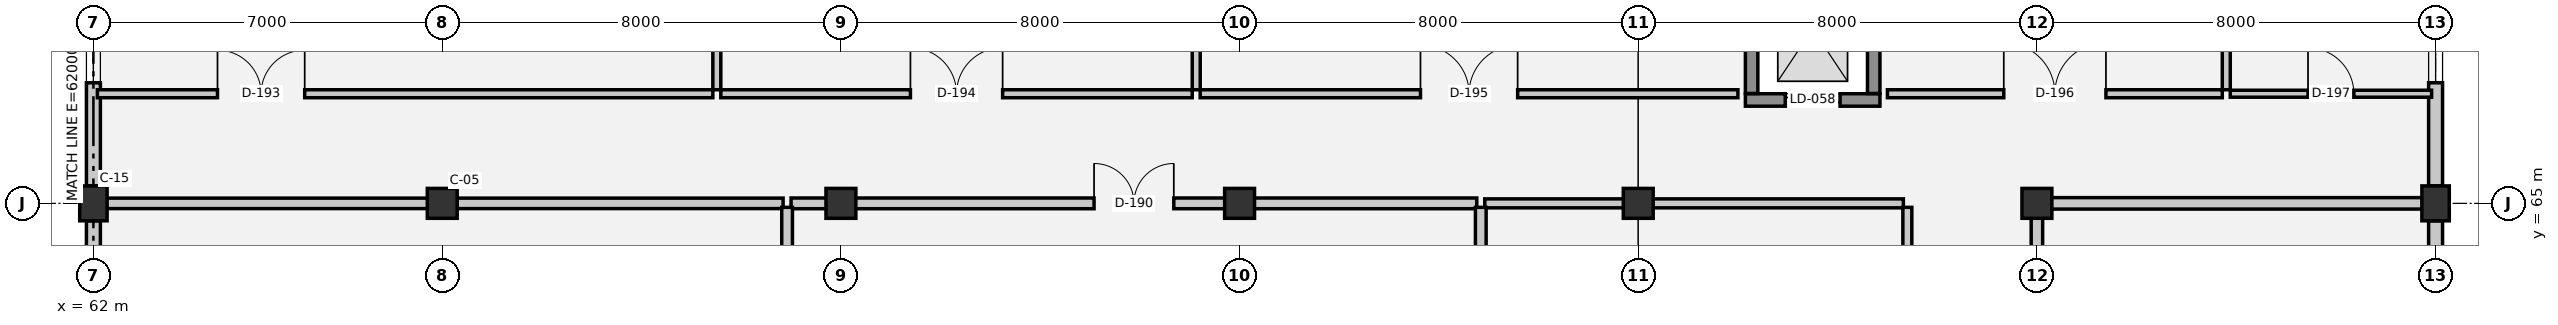
"""IFC4 building model, lengths in metres.
Left out: names, types, materials, properties, quantities, classifications, styles, units other than length and angle.
Written with IfcOpenShell. Run it as: python <this file> out.ifc"""

import sys

from ifc_helpers import new_model, si_unit, direction, frame, frame_2d, origin, origin_2d, place, context, subcontext, project, spatial, rectangle, extrude, element, fill, save


model = new_model("IFC4")
c1 = context("Model", 3, precision=1e-05, world=origin(), true_north=direction((0.0, 1.0)))
c2 = subcontext(c1, "Body", "Model", "MODEL_VIEW")
j1 = project(units=[si_unit("LENGTHUNIT", "METRE"), si_unit("PLANEANGLEUNIT", "RADIAN")], contexts=[c1])
p1 = place(None, origin())
s1 = spatial("IfcSite", under=j1, at=p1, CompositionType="ELEMENT")
p2 = place(p1, origin())
s2 = spatial("IfcBuilding", under=s1, at=p2, CompositionType="ELEMENT")
p3 = place(p2, frame((0.0, 0.0, 29.55)))
s3 = spatial("IfcBuildingStorey", under=s2, at=p3, CompositionType="ELEMENT", Elevation=29.55)
p4 = place(p3, frame((62.0, 65.0, 0.0), z_axis=(0.0, 0.0, 1.0), x_axis=(1.0, 0.0, 0.0)))
e1 = element("IfcColumn", 1, at=p4, inside=s3, PredefinedType="COLUMN", context=c2, shape_type="SweptSolid", body=[
    extrude(rectangle(XDim=0.55, YDim=0.7, at=origin_2d()), origin(), (0.0, 0.0, 1.0), 3.75),
])
for number, where, z_axis, x_axis in (
    (2, (69.0, 65.0, 0.0), (0.0, 0.0, 1.0), (1.0, 0.0, 0.0)),
    (3, (77.0, 65.0, 0.0), (0.0, 0.0, 1.0), (1.0, 0.0, 0.0)),
    (4, (85.0, 65.0, 0.0), (0.0, 0.0, 1.0), (1.0, 0.0, 0.0)),
    (5, (93.0, 65.0, 0.0), (0.0, 0.0, 1.0), (1.0, 0.0, 0.0)),
    (6, (101.0, 65.0, 0.0), (0.0, 0.0, 1.0), (1.0, 0.0, 0.0)),
):
    element("IfcColumn", number, at=place(p3, frame(where, z_axis=z_axis, x_axis=x_axis)), inside=s3, PredefinedType="COLUMN", context=c2, shape_type="SweptSolid", body=[
        extrude(rectangle(XDim=0.6, YDim=0.6, at=origin_2d()), origin(), (0.0, 0.0, 1.0), 3.75),
    ])
p5 = place(p3, frame((109.0, 65.0, 0.0), z_axis=(0.0, 0.0, 1.0), x_axis=(1.0, 0.0, 0.0)))
e7 = element("IfcColumn", 7, at=p5, inside=s3, PredefinedType="COLUMN", context=c2, shape_type="SweptSolid", body=[
    extrude(rectangle(XDim=0.55, YDim=0.7, at=origin_2d()), origin(), (0.0, 0.0, 1.0), 3.75),
])
p6 = place(p3, frame((62.0, 51.35, 0.0), z_axis=(0.0, 0.0, 1.0), x_axis=(0.0, 1.0, 0.0)))
e8 = element("IfcWall", 8, at=p6, inside=s3, PredefinedType="SOLIDWALL", context=c2, shape_type="SweptSolid", body=[
    extrude(rectangle(XDim=13.3, YDim=0.28, at=frame_2d((6.65, 0.0))), origin(), (0.0, 0.0, 1.0), 2.56),
])
p7 = place(p6, frame((5.55, 0.0, 0.9)))
e9 = element("IfcOpeningElement", 9, at=p7, cuts=e8, PredefinedType="OPENING", context=c2, shape_type="SweptSolid", body=[
    extrude(rectangle(XDim=2.2, YDim=1.0, at=frame_2d((1.1, 0.5))), frame((0.0, 0.15, 0.0), z_axis=(0.0, -1.0, 0.0), x_axis=(1.0, 0.0, 0.0)), (0.0, 0.0, 1.0), 0.3),
])
p8 = place(p3, frame((62.0, 65.35, 0.0), z_axis=(0.0, 0.0, 1.0), x_axis=(0.0, 1.0, 0.0)))
e10 = element("IfcWall", 10, at=p8, inside=s3, PredefinedType="SOLIDWALL", context=c2, shape_type="SweptSolid", body=[
    extrude(rectangle(XDim=6.3, YDim=0.28, at=frame_2d((3.15, 0.0))), origin(), (0.0, 0.0, 1.0), 2.56),
])
p9 = place(p8, frame((2.07, 0.0, 0.9)))
e11 = element("IfcOpeningElement", 11, at=p9, cuts=e10, PredefinedType="OPENING", context=c2, shape_type="SweptSolid", body=[
    extrude(rectangle(XDim=2.2, YDim=1.0, at=frame_2d((1.1, 0.5))), frame((0.0, 0.15, 0.0), z_axis=(0.0, -1.0, 0.0), x_axis=(1.0, 0.0, 0.0)), (0.0, 0.0, 1.0), 0.3),
])
p10 = place(p3, frame((109.0, 71.65, 0.0), z_axis=(0.0, 0.0, 1.0), x_axis=(0.0, -1.0, 0.0)))
e12 = element("IfcWall", 12, at=p10, inside=s3, PredefinedType="SOLIDWALL", context=c2, shape_type="SweptSolid", body=[
    extrude(rectangle(XDim=6.3, YDim=0.28, at=frame_2d((3.15, 0.0))), origin(), (0.0, 0.0, 1.0), 2.56),
])
p11 = place(p10, frame((2.03, 0.0, 0.9)))
e13 = element("IfcOpeningElement", 13, at=p11, cuts=e12, PredefinedType="OPENING", context=c2, shape_type="SweptSolid", body=[
    extrude(rectangle(XDim=2.2, YDim=1.0, at=frame_2d((1.1, 0.5))), frame((0.0, 0.15, 0.0), z_axis=(0.0, -1.0, 0.0), x_axis=(1.0, 0.0, 0.0)), (0.0, 0.0, 1.0), 0.3),
])
p12 = place(p3, frame((109.0, 64.65, 0.0), z_axis=(0.0, 0.0, 1.0), x_axis=(0.0, -1.0, 0.0)))
e14 = element("IfcWall", 14, at=p12, inside=s3, PredefinedType="SOLIDWALL", context=c2, shape_type="SweptSolid", body=[
    extrude(rectangle(XDim=13.3, YDim=0.28, at=frame_2d((6.65, 0.0))), origin(), (0.0, 0.0, 1.0), 2.56),
])
p13 = place(p12, frame((5.55, 0.0, 0.9)))
e15 = element("IfcOpeningElement", 15, at=p13, cuts=e14, PredefinedType="OPENING", context=c2, shape_type="SweptSolid", body=[
    extrude(rectangle(XDim=2.2, YDim=1.0, at=frame_2d((1.1, 0.5))), frame((0.0, 0.15, 0.0), z_axis=(0.0, -1.0, 0.0), x_axis=(1.0, 0.0, 0.0)), (0.0, 0.0, 1.0), 0.3),
])
p14 = place(p3, frame((95.15, 67.075, 0.0), z_axis=(0.0, 0.0, 1.0), x_axis=(1.0, 0.0, 0.0)))
e16 = element("IfcWall", 16, at=p14, inside=s3, PredefinedType="SHEAR", context=c2, shape_type="SweptSolid", body=[
    extrude(rectangle(XDim=2.7, YDim=0.25, at=frame_2d((1.35, 0.0))), origin(), (0.0, 0.0, 1.0), 3.75),
])
p15 = place(p14, frame((0.8, 0.0, 0.0)))
e17 = element("IfcOpeningElement", 17, at=p15, cuts=e16, PredefinedType="OPENING", context=c2, shape_type="SweptSolid", body=[
    extrude(rectangle(XDim=1.1, YDim=2.15, at=frame_2d((0.55, 1.075))), frame((0.0, 0.135, 0.0), z_axis=(0.0, -1.0, 0.0), x_axis=(1.0, 0.0, 0.0)), (0.0, 0.0, 1.0), 0.27),
])
for number, where, z_axis, x_axis in (
    (18, (95.275, 69.795, 0.0), (0.0, 0.0, 1.0), (0.0, -1.0, 0.0)),
    (19, (97.725, 67.205, 0.0), (0.0, 0.0, 1.0), (0.0, 1.0, 0.0)),
):
    element("IfcWall", number, at=place(p3, frame(where, z_axis=z_axis, x_axis=x_axis)), inside=s3, PredefinedType="SHEAR", context=c2, shape_type="SweptSolid", body=[
        extrude(rectangle(XDim=2.59, YDim=0.25, at=frame_2d((1.295, 0.0))), origin(), (0.0, 0.0, 1.0), 3.75),
    ])
p16 = place(p3, frame((62.08, 65.0, 0.0), z_axis=(0.0, 0.0, 1.0), x_axis=(1.0, 0.0, 0.0)))
e20 = element("IfcWall", 20, at=p16, inside=s3, PredefinedType="PARTITIONING", context=c2, shape_type="SweptSolid", body=[
    extrude(rectangle(XDim=13.76, YDim=0.21, at=frame_2d((6.88, 0.0))), origin(), (0.0, 0.0, 1.0), 2.78),
])
p17 = place(p3, frame((76.0, 65.0, 0.0), z_axis=(0.0, 0.0, 1.0), x_axis=(1.0, 0.0, 0.0)))
e21 = element("IfcWall", 21, at=p17, inside=s3, PredefinedType="PARTITIONING", context=c2, shape_type="SweptSolid", body=[
    extrude(rectangle(XDim=13.76, YDim=0.215, at=frame_2d((6.88, 0.0))), origin(), (0.0, 0.0, 1.0), 2.78),
])
p18 = place(p17, frame((6.08, 0.0, 0.0)))
e22 = element("IfcOpeningElement", 22, at=p18, cuts=e21, PredefinedType="OPENING", context=c2, shape_type="SweptSolid", body=[
    extrude(rectangle(XDim=1.6, YDim=2.25, at=frame_2d((0.8, 1.125))), frame((0.0, 0.117, 0.0), z_axis=(0.0, -1.0, 0.0), x_axis=(1.0, 0.0, 0.0)), (0.0, 0.0, 1.0), 0.235),
])
p19 = place(p3, frame((89.92, 65.0, 0.0), z_axis=(0.0, 0.0, 1.0), x_axis=(1.0, 0.0, 0.0)))
e23 = element("IfcWall", 23, at=p19, inside=s3, PredefinedType="PARTITIONING", context=c2, shape_type="SweptSolid", body=[
    extrude(rectangle(XDim=8.4, YDim=0.18, at=frame_2d((4.2, 0.0))), origin(), (0.0, 0.0, 1.0), 2.78),
])
p20 = place(p3, frame((101.08, 65.0, 0.0), z_axis=(0.0, 0.0, 1.0), x_axis=(1.0, 0.0, 0.0)))
e24 = element("IfcWall", 24, at=p20, inside=s3, PredefinedType="PARTITIONING", context=c2, shape_type="SweptSolid", body=[
    extrude(rectangle(XDim=7.84, YDim=0.23, at=frame_2d((3.92, 0.0))), origin(), (0.0, 0.0, 1.0), 2.78),
])
p21 = place(p3, frame((62.08, 67.2, 0.0), z_axis=(0.0, 0.0, 1.0), x_axis=(1.0, 0.0, 0.0)))
e25 = element("IfcWall", 25, at=p21, inside=s3, PredefinedType="PARTITIONING", context=c2, shape_type="SweptSolid", body=[
    extrude(rectangle(XDim=12.35, YDim=0.16, at=frame_2d((6.175, 0.0))), origin(), (0.0, 0.0, 1.0), 3.39),
])
p22 = place(p21, frame((2.41, 0.0, 0.0)))
e26 = element("IfcOpeningElement", 26, at=p22, cuts=e25, PredefinedType="OPENING", context=c2, shape_type="SweptSolid", body=[
    extrude(rectangle(XDim=1.75, YDim=2.3, at=frame_2d((0.875, 1.15))), frame((0.0, 0.09, 0.0), z_axis=(0.0, -1.0, 0.0), x_axis=(1.0, 0.0, 0.0)), (0.0, 0.0, 1.0), 0.18),
])
p23 = place(p3, frame((74.59, 67.2, 0.0), z_axis=(0.0, 0.0, 1.0), x_axis=(1.0, 0.0, 0.0)))
e27 = element("IfcWall", 27, at=p23, inside=s3, PredefinedType="PARTITIONING", context=c2, shape_type="SweptSolid", body=[
    extrude(rectangle(XDim=9.46, YDim=0.16, at=frame_2d((4.73, 0.0))), origin(), (0.0, 0.0, 1.0), 3.39),
])
p24 = place(p23, frame((3.805, 0.0, 0.0)))
e28 = element("IfcOpeningElement", 28, at=p24, cuts=e27, PredefinedType="OPENING", context=c2, shape_type="SweptSolid", body=[
    extrude(rectangle(XDim=1.85, YDim=2.3, at=frame_2d((0.925, 1.15))), frame((0.0, 0.09, 0.0), z_axis=(0.0, -1.0, 0.0), x_axis=(1.0, 0.0, 0.0)), (0.0, 0.0, 1.0), 0.18),
])
p25 = place(p3, frame((84.21, 67.2, 0.0), z_axis=(0.0, 0.0, 1.0), x_axis=(1.0, 0.0, 0.0)))
e29 = element("IfcWall", 29, at=p25, inside=s3, PredefinedType="PARTITIONING", context=c2, shape_type="SweptSolid", body=[
    extrude(rectangle(XDim=10.79, YDim=0.16, at=frame_2d((5.395, 0.0))), origin(), (0.0, 0.0, 1.0), 3.39),
])
p26 = place(p25, frame((4.42, 0.0, 0.0)))
e30 = element("IfcOpeningElement", 30, at=p26, cuts=e29, PredefinedType="OPENING", context=c2, shape_type="SweptSolid", body=[
    extrude(rectangle(XDim=1.95, YDim=2.35, at=frame_2d((0.975, 1.175))), frame((0.0, 0.09, 0.0), z_axis=(0.0, -1.0, 0.0), x_axis=(1.0, 0.0, 0.0)), (0.0, 0.0, 1.0), 0.18),
])
p27 = place(p3, frame((98.0, 67.2, 0.0), z_axis=(0.0, 0.0, 1.0), x_axis=(1.0, 0.0, 0.0)))
e31 = element("IfcWall", 31, at=p27, inside=s3, PredefinedType="PARTITIONING", context=c2, shape_type="SweptSolid", body=[
    extrude(rectangle(XDim=6.72, YDim=0.16, at=frame_2d((3.36, 0.0))), origin(), (0.0, 0.0, 1.0), 3.39),
])
p28 = place(p27, frame((2.335, 0.0, 0.0)))
e32 = element("IfcOpeningElement", 32, at=p28, cuts=e31, PredefinedType="OPENING", context=c2, shape_type="SweptSolid", body=[
    extrude(rectangle(XDim=2.05, YDim=2.35, at=frame_2d((1.025, 1.175))), frame((0.0, 0.09, 0.0), z_axis=(0.0, -1.0, 0.0), x_axis=(1.0, 0.0, 0.0)), (0.0, 0.0, 1.0), 0.18),
])
p29 = place(p3, frame((104.88, 67.2, 0.0), z_axis=(0.0, 0.0, 1.0), x_axis=(1.0, 0.0, 0.0)))
e33 = element("IfcWall", 33, at=p29, inside=s3, PredefinedType="PLUMBINGWALL", context=c2, shape_type="SweptSolid", body=[
    extrude(rectangle(XDim=4.04, YDim=0.14, at=frame_2d((2.02, 0.0))), origin(), (0.0, 0.0, 1.0), 3.39),
])
p30 = place(p29, frame((1.56, 0.0, 0.0)))
e34 = element("IfcOpeningElement", 34, at=p30, cuts=e33, PredefinedType="OPENING", context=c2, shape_type="SweptSolid", body=[
    extrude(rectangle(XDim=0.92, YDim=2.1, at=frame_2d((0.46, 1.05))), frame((0.0, 0.08, 0.0), z_axis=(0.0, -1.0, 0.0), x_axis=(1.0, 0.0, 0.0)), (0.0, 0.0, 1.0), 0.16),
])
p31 = place(p3, frame((74.51, 67.28, 0.0), z_axis=(0.0, 0.0, 1.0), x_axis=(0.0, 1.0, 0.0)))
e35 = element("IfcWall", 35, at=p31, inside=s3, PredefinedType="PARTITIONING", context=c2, shape_type="SweptSolid", body=[
    extrude(rectangle(XDim=4.64, YDim=0.16, at=frame_2d((2.32, 0.0))), origin(), (0.0, 0.0, 1.0), 3.39),
])
p32 = place(p3, frame((75.92, 51.08, 0.0), z_axis=(0.0, 0.0, 1.0), x_axis=(0.0, 1.0, 0.0)))
e36 = element("IfcWall", 36, at=p32, inside=s3, PredefinedType="PARTITIONING", context=c2, shape_type="SweptSolid", body=[
    extrude(rectangle(XDim=13.84, YDim=0.215, at=frame_2d((6.92, 0.0))), origin(), (0.0, 0.0, 1.0), 3.39),
])
p33 = place(p3, frame((84.13, 67.28, 0.0), z_axis=(0.0, 0.0, 1.0), x_axis=(0.0, 1.0, 0.0)))
e37 = element("IfcWall", 37, at=p33, inside=s3, PredefinedType="PARTITIONING", context=c2, shape_type="SweptSolid", body=[
    extrude(rectangle(XDim=4.64, YDim=0.16, at=frame_2d((2.32, 0.0))), origin(), (0.0, 0.0, 1.0), 3.39),
])
p34 = place(p3, frame((89.84, 51.08, 0.0), z_axis=(0.0, 0.0, 1.0), x_axis=(0.0, 1.0, 0.0)))
e38 = element("IfcWall", 38, at=p34, inside=s3, PredefinedType="PARTITIONING", context=c2, shape_type="SweptSolid", body=[
    extrude(rectangle(XDim=13.84, YDim=0.215, at=frame_2d((6.92, 0.0))), origin(), (0.0, 0.0, 1.0), 3.39),
])
p35 = place(p3, frame((98.4, 51.08, 0.0), z_axis=(0.0, 0.0, 1.0), x_axis=(0.0, 1.0, 0.0)))
e39 = element("IfcWall", 39, at=p35, inside=s3, PredefinedType="PARTITIONING", context=c2, shape_type="SweptSolid", body=[
    extrude(rectangle(XDim=13.84, YDim=0.18, at=frame_2d((6.92, 0.0))), origin(), (0.0, 0.0, 1.0), 3.39),
])
p36 = place(p35, frame((6.345, 0.0, 0.0)))
e40 = element("IfcOpeningElement", 40, at=p36, cuts=e39, PredefinedType="OPENING", context=c2, shape_type="SweptSolid", body=[
    extrude(rectangle(XDim=1.15, YDim=2.2, at=frame_2d((0.575, 1.1))), frame((0.0, 0.1, 0.0), z_axis=(0.0, -1.0, 0.0), x_axis=(1.0, 0.0, 0.0)), (0.0, 0.0, 1.0), 0.2),
])
p37 = place(p3, frame((101.0, 51.08, 0.0), z_axis=(0.0, 0.0, 1.0), x_axis=(0.0, 1.0, 0.0)))
e41 = element("IfcWall", 41, at=p37, inside=s3, PredefinedType="PARTITIONING", context=c2, shape_type="SweptSolid", body=[
    extrude(rectangle(XDim=13.84, YDim=0.23, at=frame_2d((6.92, 0.0))), origin(), (0.0, 0.0, 1.0), 2.58),
])
p38 = place(p37, frame((6.07, 0.0, 0.0)))
e42 = element("IfcOpeningElement", 42, at=p38, cuts=e41, PredefinedType="OPENING", context=c2, shape_type="SweptSolid", body=[
    extrude(rectangle(XDim=1.7, YDim=2.3, at=frame_2d((0.85, 1.15))), frame((0.0, 0.125, 0.0), z_axis=(0.0, -1.0, 0.0), x_axis=(1.0, 0.0, 0.0)), (0.0, 0.0, 1.0), 0.25),
])
p39 = place(p3, frame((104.8, 67.28, 0.0), z_axis=(0.0, 0.0, 1.0), x_axis=(0.0, 1.0, 0.0)))
e43 = element("IfcWall", 43, at=p39, inside=s3, PredefinedType="PARTITIONING", context=c2, shape_type="SweptSolid", body=[
    extrude(rectangle(XDim=4.64, YDim=0.16, at=frame_2d((2.32, 0.0))), origin(), (0.0, 0.0, 1.0), 3.39),
])
p40 = place(p9, origin())
e44 = element("IfcWindow", 44, at=p40, inside=s3, PartitioningType="SINGLE_PANEL", PredefinedType="WINDOW", context=c2, shape_type="SweptSolid", body=[
    extrude(rectangle(XDim=2.2, YDim=1.0, at=frame_2d((1.1, 0.5))), frame((0.0, 0.03, 0.0), z_axis=(0.0, -1.0, 0.0), x_axis=(1.0, 0.0, 0.0)), (0.0, 0.0, 1.0), 0.06),
])
fill(e11, e44)
p41 = place(p11, origin())
e45 = element("IfcWindow", 45, at=p41, inside=s3, PartitioningType="SINGLE_PANEL", PredefinedType="WINDOW", context=c2, shape_type="SweptSolid", body=[
    extrude(rectangle(XDim=2.2, YDim=1.0, at=frame_2d((1.1, 0.5))), frame((0.0, 0.03, 0.0), z_axis=(0.0, -1.0, 0.0), x_axis=(1.0, 0.0, 0.0)), (0.0, 0.0, 1.0), 0.06),
])
fill(e13, e45)
p42 = place(p15, origin())
e46 = element("IfcDoor", 46, at=p42, inside=s3, OperationType="DOUBLE_DOOR_SLIDING", PredefinedType="DOOR", context=c2, shape_type="SweptSolid", body=[
    extrude(rectangle(XDim=1.1, YDim=2.15, at=frame_2d((0.55, 1.075))), frame((0.0, 0.025, 0.0), z_axis=(0.0, -1.0, 0.0), x_axis=(1.0, 0.0, 0.0)), (0.0, 0.0, 1.0), 0.05),
])
fill(e17, e46)
p43 = place(p18, origin())
e47 = element("IfcDoor", 47, at=p43, inside=s3, OperationType="DOUBLE_DOOR_SINGLE_SWING", PredefinedType="DOOR", context=c2, shape_type="SweptSolid", body=[
    extrude(rectangle(XDim=1.6, YDim=2.25, at=frame_2d((0.8, 1.125))), frame((0.0, 0.025, 0.0), z_axis=(0.0, -1.0, 0.0), x_axis=(1.0, 0.0, 0.0)), (0.0, 0.0, 1.0), 0.05),
])
fill(e22, e47)
p44 = place(p22, origin())
e48 = element("IfcDoor", 48, at=p44, inside=s3, OperationType="DOUBLE_DOOR_SINGLE_SWING", PredefinedType="DOOR", context=c2, shape_type="SweptSolid", body=[
    extrude(rectangle(XDim=1.75, YDim=2.3, at=frame_2d((0.875, 1.15))), frame((0.0, 0.025, 0.0), z_axis=(0.0, -1.0, 0.0), x_axis=(1.0, 0.0, 0.0)), (0.0, 0.0, 1.0), 0.05),
])
fill(e26, e48)
p45 = place(p24, origin())
e49 = element("IfcDoor", 49, at=p45, inside=s3, OperationType="DOUBLE_DOOR_SINGLE_SWING", PredefinedType="DOOR", context=c2, shape_type="SweptSolid", body=[
    extrude(rectangle(XDim=1.85, YDim=2.3, at=frame_2d((0.925, 1.15))), frame((0.0, 0.025, 0.0), z_axis=(0.0, -1.0, 0.0), x_axis=(1.0, 0.0, 0.0)), (0.0, 0.0, 1.0), 0.05),
])
fill(e28, e49)
p46 = place(p26, origin())
e50 = element("IfcDoor", 50, at=p46, inside=s3, OperationType="DOUBLE_DOOR_SINGLE_SWING", PredefinedType="DOOR", context=c2, shape_type="SweptSolid", body=[
    extrude(rectangle(XDim=1.95, YDim=2.35, at=frame_2d((0.975, 1.175))), frame((0.0, 0.025, 0.0), z_axis=(0.0, -1.0, 0.0), x_axis=(1.0, 0.0, 0.0)), (0.0, 0.0, 1.0), 0.05),
])
fill(e30, e50)
p47 = place(p28, origin())
e51 = element("IfcDoor", 51, at=p47, inside=s3, OperationType="DOUBLE_DOOR_SINGLE_SWING", PredefinedType="DOOR", context=c2, shape_type="SweptSolid", body=[
    extrude(rectangle(XDim=2.05, YDim=2.35, at=frame_2d((1.025, 1.175))), frame((0.0, 0.025, 0.0), z_axis=(0.0, -1.0, 0.0), x_axis=(1.0, 0.0, 0.0)), (0.0, 0.0, 1.0), 0.05),
])
fill(e32, e51)
p48 = place(p30, origin())
e52 = element("IfcDoor", 52, at=p48, inside=s3, OperationType="SINGLE_SWING_LEFT", PredefinedType="DOOR", context=c2, shape_type="SweptSolid", body=[
    extrude(rectangle(XDim=0.92, YDim=2.1, at=frame_2d((0.46, 1.05))), frame((0.0, 0.025, 0.0), z_axis=(0.0, -1.0, 0.0), x_axis=(1.0, 0.0, 0.0)), (0.0, 0.0, 1.0), 0.05),
])
fill(e34, e52)
save(model, sys.argv[1])
